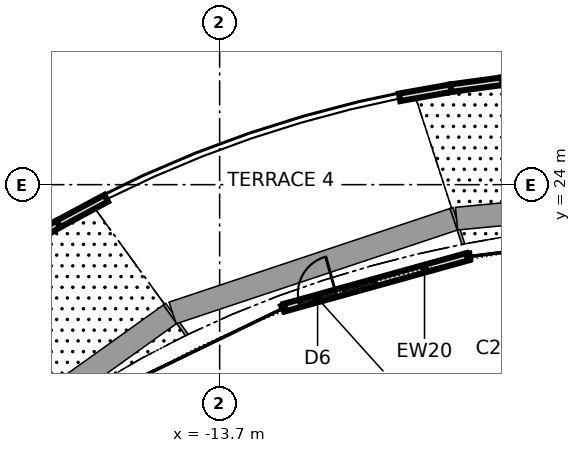
"""IFC4 building model, lengths in metres.
Left out: names, types, materials, properties, quantities, classifications, styles, units other than length and angle.
Written with IfcOpenShell. Run it as: python <this file> out.ifc"""

import sys

from ifc_helpers import new_model, si_unit, direction, frame, frame_2d, origin, place, context, subcontext, project, spatial, rectangle, extrude, element, fill, save


model = new_model("IFC4")
c1 = context("Model", 3, precision=1e-05, world=origin(), true_north=direction((0.0, 1.0)))
c2 = subcontext(c1, "Body", "Model", "MODEL_VIEW")
j1 = project(units=[si_unit("LENGTHUNIT", "METRE"), si_unit("PLANEANGLEUNIT", "RADIAN")], contexts=[c1])
p1 = place(None, origin())
s1 = spatial("IfcSite", under=j1, at=p1, CompositionType="ELEMENT")
p2 = place(p1, origin())
s2 = spatial("IfcBuilding", under=s1, at=p2, CompositionType="ELEMENT")
p3 = place(p2, frame((0.0, 0.0, 19.6)))
s3 = spatial("IfcBuildingStorey", under=s2, at=p3, CompositionType="ELEMENT", Elevation=19.6)
p4 = place(p3, frame((-7.182, 22.103, 0.0), z_axis=(0.0, 0.0, 1.0), x_axis=(-0.963467423548, -0.267825547253, 0.0)))
e1 = element("IfcWall", 1, at=p4, inside=s3, PredefinedType="SOLIDWALL", context=c2, shape_type="SweptSolid", body=[
    extrude(rectangle(XDim=4.99, YDim=0.2, at=frame_2d((2.495, 0.0))), origin(), (0.0, 0.0, 1.0), 4.04),
])
p5 = place(p4, frame((3.59, 0.0, 0.0)))
e2 = element("IfcOpeningElement", 2, at=p5, cuts=e1, PredefinedType="OPENING", context=c2, shape_type="SweptSolid", body=[
    extrude(rectangle(XDim=1.0, YDim=2.4, at=frame_2d((0.5, 1.2))), frame((0.0, 0.11, 0.0), z_axis=(0.0, -1.0, 0.0), x_axis=(1.0, 0.0, 0.0)), (0.0, 0.0, 1.0), 0.22),
])
p6 = place(p4, frame((2.49, 0.0, 0.3)))
e3 = element("IfcOpeningElement", 3, at=p6, cuts=e1, PredefinedType="OPENING", context=c2, shape_type="SweptSolid", body=[
    extrude(rectangle(XDim=0.9, YDim=2.1, at=frame_2d((0.45, 1.05))), frame((0.0, 0.11, 0.0), z_axis=(0.0, -1.0, 0.0), x_axis=(1.0, 0.0, 0.0)), (0.0, 0.0, 1.0), 0.22),
])
p7 = place(p4, frame((3.59, 0.0, 2.7)))
e4 = element("IfcOpeningElement", 4, at=p7, cuts=e1, PredefinedType="OPENING", context=c2, shape_type="SweptSolid", body=[
    extrude(rectangle(XDim=1.0, YDim=0.6, at=frame_2d((0.5, 0.3))), frame((0.0, 0.11, 0.0), z_axis=(0.0, -1.0, 0.0), x_axis=(1.0, 0.0, 0.0)), (0.0, 0.0, 1.0), 0.22),
])
p8 = place(p3, frame((-6.269, 26.722, 0.0), z_axis=(0.0, 0.0, 1.0), x_axis=(-0.990868366609, -0.134832785527, 0.0)))
e5 = element("IfcWall", 5, at=p8, inside=s3, PredefinedType="PARAPET", context=c2, shape_type="SweptSolid", body=[
    extrude(rectangle(XDim=1.36, YDim=0.2, at=frame_2d((0.68, 0.0))), origin(), (0.0, 0.0, 1.0), 1.1),
])
p9 = place(p3, frame((-7.616, 26.539, 0.0), z_axis=(0.0, 0.0, 1.0), x_axis=(-0.984368024696, -0.176123797247, 0.0)))
e6 = element("IfcWall", 6, at=p9, inside=s3, PredefinedType="PARAPET", context=c2, shape_type="SweptSolid", body=[
    extrude(rectangle(XDim=1.37, YDim=0.2, at=frame_2d((0.685, 0.0))), origin(), (0.0, 0.0, 1.0), 1.1),
])
p10 = place(p3, frame((-16.686, 23.642, 0.0), z_axis=(0.0, 0.0, 1.0), x_axis=(-0.881002336607, -0.473111913709, 0.0)))
e7 = element("IfcWall", 7, at=p10, inside=s3, PredefinedType="PARAPET", context=c2, shape_type="SweptSolid", body=[
    extrude(rectangle(XDim=1.43, YDim=0.2, at=frame_2d((0.715, 0.0))), origin(), (0.0, 0.0, 1.0), 1.1),
])
p11 = place(p3, frame((-17.946, 22.966, 0.0), z_axis=(0.0, 0.0, 1.0), x_axis=(-0.856459069537, -0.516214937993, 0.0)))
e8 = element("IfcWall", 8, at=p11, inside=s3, PredefinedType="PARAPET", context=c2, shape_type="SweptSolid", body=[
    extrude(rectangle(XDim=1.44, YDim=0.2, at=frame_2d((0.72, 0.0))), origin(), (0.0, 0.0, 1.0), 1.1),
])
p12 = place(p5, frame((1.0, 0.0, 0.0), z_axis=(0.0, 0.0, 1.0), x_axis=(-1.0, 0.0, 0.0)))
e9 = element("IfcDoor", 9, at=p12, inside=s3, OperationType="SINGLE_SWING_RIGHT", PredefinedType="DOOR", context=c2, shape_type="SweptSolid", body=[
    extrude(rectangle(XDim=1.0, YDim=2.4, at=frame_2d((0.5, 1.2))), frame((0.0, 0.025, 0.0), z_axis=(0.0, -1.0, 0.0), x_axis=(1.0, 0.0, 0.0)), (0.0, 0.0, 1.0), 0.05),
])
fill(e2, e9)
p13 = place(p6, origin())
e10 = element("IfcWindow", 10, at=p13, inside=s3, PartitioningType="SINGLE_PANEL", PredefinedType="WINDOW", context=c2, shape_type="SweptSolid", body=[
    extrude(rectangle(XDim=0.9, YDim=2.1, at=frame_2d((0.45, 1.05))), frame((0.0, 0.03, 0.0), z_axis=(0.0, -1.0, 0.0), x_axis=(1.0, 0.0, 0.0)), (0.0, 0.0, 1.0), 0.06),
])
fill(e3, e10)
p14 = place(p7, origin())
e11 = element("IfcWindow", 11, at=p14, inside=s3, PartitioningType="SINGLE_PANEL", PredefinedType="WINDOW", context=c2, shape_type="SweptSolid", body=[
    extrude(rectangle(XDim=1.0, YDim=0.6, at=frame_2d((0.5, 0.3))), frame((0.0, 0.03, 0.0), z_axis=(0.0, -1.0, 0.0), x_axis=(1.0, 0.0, 0.0)), (0.0, 0.0, 1.0), 0.06),
])
fill(e4, e11)
save(model, sys.argv[1])
